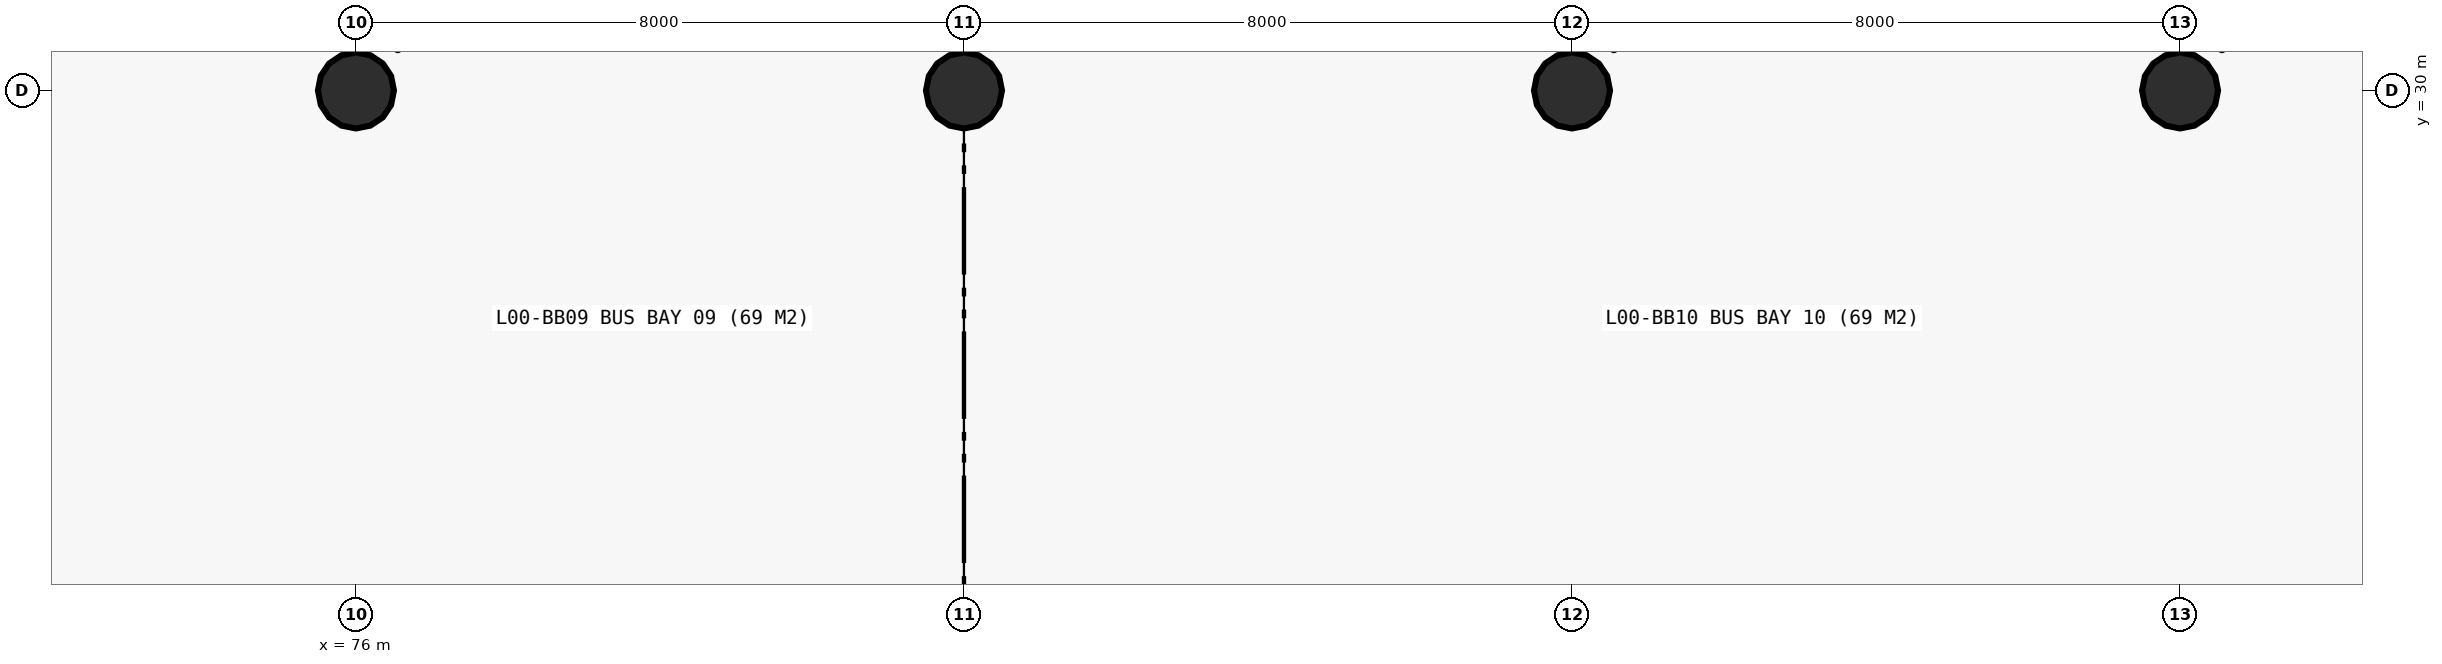
"""IFC4 building model, lengths in metres.
Left out: names, types, materials, properties, quantities, classifications, styles, units other than length and angle.
Written with IfcOpenShell. Run it as: python <this file> out.ifc"""

import sys

from ifc_helpers import new_model, si_unit, direction, frame, origin, origin_2d, place, context, subcontext, project, spatial, circle, extrude, element, save


model = new_model("IFC4")
c1 = context("Model", 3, precision=1e-05, world=origin(), true_north=direction((0.0, 1.0)))
c2 = subcontext(c1, "Body", "Model", "MODEL_VIEW")
j1 = project(units=[si_unit("LENGTHUNIT", "METRE"), si_unit("PLANEANGLEUNIT", "RADIAN")], contexts=[c1])
p1 = place(None, origin())
s1 = spatial("IfcSite", under=j1, at=p1, CompositionType="ELEMENT")
p2 = place(p1, origin())
s2 = spatial("IfcBuilding", under=s1, at=p2, CompositionType="ELEMENT")
p3 = place(p2, origin())
s3 = spatial("IfcBuildingStorey", under=s2, at=p3, CompositionType="ELEMENT", Elevation=0.0)
for number, where, z_axis, x_axis in (
    (1, (76.0, 30.0, 0.0), (0.0, 0.0, 1.0), (1.0, 0.0, 0.0)),
    (2, (84.0, 30.0, 0.0), (0.0, 0.0, 1.0), (1.0, 0.0, 0.0)),
    (3, (92.0, 30.0, 0.0), (0.0, 0.0, 1.0), (1.0, 0.0, 0.0)),
    (4, (100.0, 30.0, 0.0), (0.0, 0.0, 1.0), (1.0, 0.0, 0.0)),
):
    element("IfcColumn", number, at=place(p3, frame(where, z_axis=z_axis, x_axis=x_axis)), inside=s3, PredefinedType="COLUMN", context=c2, shape_type="SweptSolid", body=[
        extrude(circle(Radius=0.5, at=origin_2d()), origin(), (0.0, 0.0, 1.0), 6.02),
    ])
save(model, sys.argv[1])
